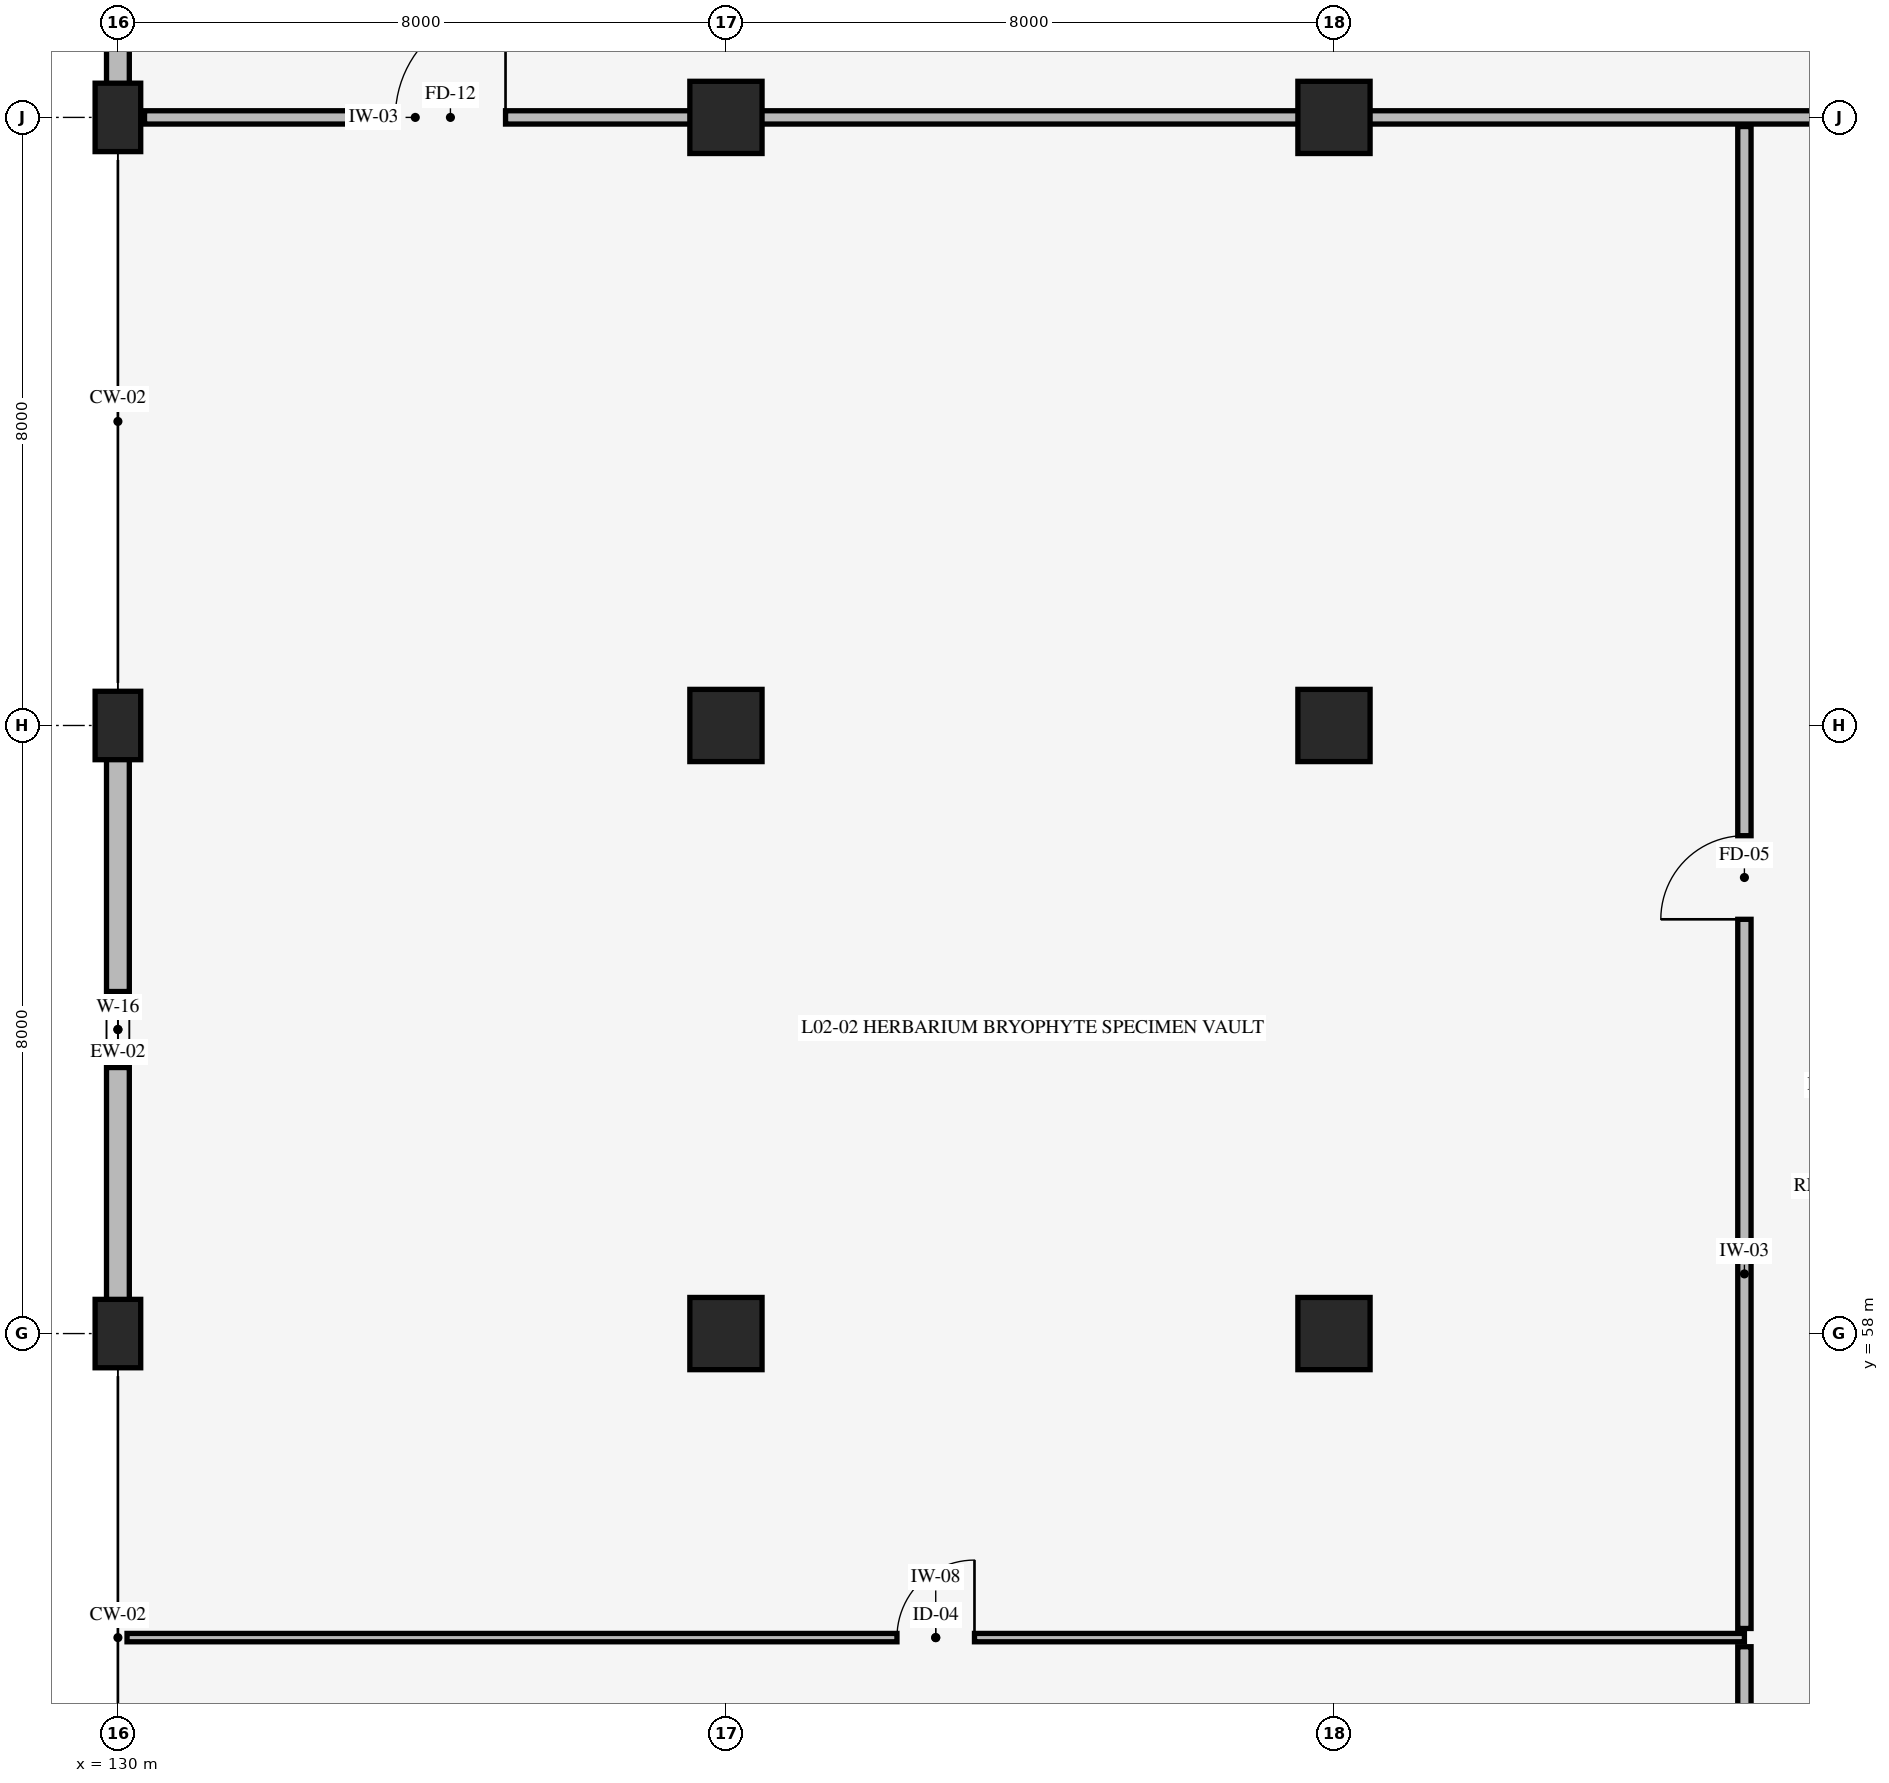
"""IFC4 building model, lengths in metres.
Left out: names, types, materials, properties, quantities, classifications, styles, units other than length and angle.
Written with IfcOpenShell. Run it as: python <this file> out.ifc"""

import sys

from ifc_helpers import new_model, si_unit, direction, frame, frame_2d, origin, origin_2d, place, context, subcontext, project, spatial, rectangle, extrude, element, fill, save


model = new_model("IFC4")
c1 = context("Model", 3, precision=1e-05, world=origin(), true_north=direction((0.0, 1.0)))
c2 = subcontext(c1, "Body", "Model", "MODEL_VIEW")
j1 = project(units=[si_unit("LENGTHUNIT", "METRE"), si_unit("PLANEANGLEUNIT", "RADIAN")], contexts=[c1])
p1 = place(None, origin())
s1 = spatial("IfcSite", under=j1, at=p1, CompositionType="ELEMENT")
p2 = place(p1, origin())
s2 = spatial("IfcBuilding", under=s1, at=p2, CompositionType="ELEMENT")
p3 = place(p2, frame((0.0, 0.0, 5.4)))
s3 = spatial("IfcBuildingStorey", under=s2, at=p3, CompositionType="ELEMENT", Elevation=5.4)
for number, where, z_axis, x_axis in (
    (1, (130.0, 58.0, 0.0), (0.0, 0.0, 1.0), (1.0, 0.0, 0.0)),
    (2, (130.0, 66.0, 0.0), (0.0, 0.0, 1.0), (1.0, 0.0, 0.0)),
    (3, (130.0, 74.0, 0.0), (0.0, 0.0, 1.0), (1.0, 0.0, 0.0)),
):
    element("IfcColumn", number, at=place(p3, frame(where, z_axis=z_axis, x_axis=x_axis)), inside=s3, PredefinedType="COLUMN", context=c2, shape_type="SweptSolid", body=[
        extrude(rectangle(XDim=0.6, YDim=0.9, at=origin_2d()), origin(), (0.0, 0.0, 1.0), 4.8),
    ])
for number, where, z_axis, x_axis in (
    (4, (138.0, 58.0, 0.0), (0.0, 0.0, 1.0), (1.0, 0.0, 0.0)),
    (5, (138.0, 66.0, 0.0), (0.0, 0.0, 1.0), (1.0, 0.0, 0.0)),
    (6, (138.0, 74.0, 0.0), (0.0, 0.0, 1.0), (1.0, 0.0, 0.0)),
    (7, (146.0, 58.0, 0.0), (0.0, 0.0, 1.0), (1.0, 0.0, 0.0)),
    (8, (146.0, 66.0, 0.0), (0.0, 0.0, 1.0), (1.0, 0.0, 0.0)),
    (9, (146.0, 74.0, 0.0), (0.0, 0.0, 1.0), (1.0, 0.0, 0.0)),
):
    element("IfcColumn", number, at=place(p3, frame(where, z_axis=z_axis, x_axis=x_axis)), inside=s3, PredefinedType="COLUMN", context=c2, shape_type="SweptSolid", body=[
        extrude(rectangle(XDim=0.95, YDim=0.95, at=origin_2d()), origin(), (0.0, 0.0, 1.0), 4.8),
    ])
p4 = place(p3, frame((130.0, 58.0, 0.0), z_axis=(0.0, 0.0, 1.0), x_axis=(0.0, 1.0, 0.0)))
e10 = element("IfcWall", 10, at=p4, inside=s3, PredefinedType="STANDARD", context=c2, shape_type="SweptSolid", body=[
    extrude(rectangle(XDim=8.0, YDim=0.3, at=frame_2d((4.0, 0.0))), origin(), (0.0, 0.0, 1.0), 3.55),
])
p5 = place(p4, frame((3.5, 0.0, 0.85)))
e11 = element("IfcOpeningElement", 11, at=p5, cuts=e10, PredefinedType="OPENING", context=c2, shape_type="SweptSolid", body=[
    extrude(rectangle(XDim=1.0, YDim=1.5, at=frame_2d((0.5, 0.75))), frame((0.0, 0.16, 0.0), z_axis=(0.0, -1.0, 0.0), x_axis=(1.0, 0.0, 0.0)), (0.0, 0.0, 1.0), 0.32),
])
p6 = place(p3, frame((130.0, 74.0, 0.0), z_axis=(0.0, 0.0, 1.0), x_axis=(0.0, 1.0, 0.0)))
e12 = element("IfcWall", 12, at=p6, inside=s3, PredefinedType="STANDARD", context=c2, shape_type="SweptSolid", body=[
    extrude(rectangle(XDim=8.0, YDim=0.3, at=frame_2d((4.0, 0.0))), origin(), (0.0, 0.0, 1.0), 3.55),
])
p7 = place(p6, frame((2.75, 0.0, 0.0)))
e13 = element("IfcOpeningElement", 13, at=p7, cuts=e12, PredefinedType="OPENING", context=c2, shape_type="SweptSolid", body=[
    extrude(rectangle(XDim=1.5, YDim=2.25, at=frame_2d((0.75, 1.125))), frame((0.0, 0.16, 0.0), z_axis=(0.0, -1.0, 0.0), x_axis=(1.0, 0.0, 0.0)), (0.0, 0.0, 1.0), 0.32),
])
p8 = place(p3, frame((151.4, 34.12, 0.0), z_axis=(0.0, 0.0, 1.0), x_axis=(0.0, 1.0, 0.0)))
e14 = element("IfcWall", 14, at=p8, inside=s3, PredefinedType="STANDARD", context=c2, shape_type="SweptSolid", body=[
    extrude(rectangle(XDim=19.76, YDim=0.175, at=frame_2d((9.88, 0.0))), origin(), (0.0, 0.0, 1.0), 4.5),
])
p9 = place(p8, frame((9.355, 0.0, 0.0)))
e15 = element("IfcOpeningElement", 15, at=p9, cuts=e14, PredefinedType="OPENING", context=c2, shape_type="SweptSolid", body=[
    extrude(rectangle(XDim=1.05, YDim=2.1, at=frame_2d((0.525, 1.05))), frame((0.0, 0.098, 0.0), z_axis=(0.0, -1.0, 0.0), x_axis=(1.0, 0.0, 0.0)), (0.0, 0.0, 1.0), 0.195),
])
p10 = place(p3, frame((130.12, 54.0, 0.0), z_axis=(0.0, 0.0, 1.0), x_axis=(1.0, 0.0, 0.0)))
e16 = element("IfcWall", 16, at=p10, inside=s3, PredefinedType="STANDARD", context=c2, shape_type="SweptSolid", body=[
    extrude(rectangle(XDim=21.28, YDim=0.11, at=frame_2d((10.64, 0.0))), origin(), (0.0, 0.0, 1.0), 4.5),
])
p11 = place(p10, frame((10.13, 0.0, 0.0)))
e17 = element("IfcOpeningElement", 17, at=p11, cuts=e16, PredefinedType="OPENING", context=c2, shape_type="SweptSolid", body=[
    extrude(rectangle(XDim=1.02, YDim=2.08, at=frame_2d((0.51, 1.04))), frame((0.0, 0.065, 0.0), z_axis=(0.0, -1.0, 0.0), x_axis=(1.0, 0.0, 0.0)), (0.0, 0.0, 1.0), 0.13),
])
p12 = place(p3, frame((151.4, 54.12, 0.0), z_axis=(0.0, 0.0, 1.0), x_axis=(0.0, 1.0, 0.0)))
e18 = element("IfcWall", 18, at=p12, inside=s3, PredefinedType="STANDARD", context=c2, shape_type="SweptSolid", body=[
    extrude(rectangle(XDim=19.76, YDim=0.175, at=frame_2d((9.88, 0.0))), origin(), (0.0, 0.0, 1.0), 4.5),
])
p13 = place(p12, frame((9.33, 0.0, 0.0)))
e19 = element("IfcOpeningElement", 19, at=p13, cuts=e18, PredefinedType="OPENING", context=c2, shape_type="SweptSolid", body=[
    extrude(rectangle(XDim=1.1, YDim=2.1, at=frame_2d((0.55, 1.05))), frame((0.0, 0.098, 0.0), z_axis=(0.0, -1.0, 0.0), x_axis=(1.0, 0.0, 0.0)), (0.0, 0.0, 1.0), 0.195),
])
p14 = place(p3, frame((130.35, 74.0, 0.0), z_axis=(0.0, 0.0, 1.0), x_axis=(1.0, 0.0, 0.0)))
e20 = element("IfcWall", 20, at=p14, inside=s3, PredefinedType="STANDARD", context=c2, shape_type="SweptSolid", body=[
    extrude(rectangle(XDim=31.3, YDim=0.175, at=frame_2d((15.65, 0.0))), origin(), (0.0, 0.0, 1.0), 3.6),
])
p15 = place(p14, frame((3.3, 0.0, 0.0)))
e21 = element("IfcOpeningElement", 21, at=p15, cuts=e20, PredefinedType="OPENING", context=c2, shape_type="SweptSolid", body=[
    extrude(rectangle(XDim=1.45, YDim=2.2, at=frame_2d((0.725, 1.1))), frame((0.0, 0.098, 0.0), z_axis=(0.0, -1.0, 0.0), x_axis=(1.0, 0.0, 0.0)), (0.0, 0.0, 1.0), 0.195),
])
p16 = place(p5, origin())
e22 = element("IfcWindow", 22, at=p16, inside=s3, PartitioningType="SINGLE_PANEL", PredefinedType="WINDOW", context=c2, shape_type="SweptSolid", body=[
    extrude(rectangle(XDim=1.0, YDim=1.5, at=frame_2d((0.5, 0.75))), frame((0.0, 0.03, 0.0), z_axis=(0.0, -1.0, 0.0), x_axis=(1.0, 0.0, 0.0)), (0.0, 0.0, 1.0), 0.06),
])
fill(e11, e22)
p17 = place(p11, origin())
e23 = element("IfcDoor", 23, at=p17, inside=s3, OperationType="SINGLE_SWING_RIGHT", PredefinedType="DOOR", context=c2, shape_type="SweptSolid", body=[
    extrude(rectangle(XDim=1.02, YDim=2.08, at=frame_2d((0.51, 1.04))), frame((0.0, 0.025, 0.0), z_axis=(0.0, -1.0, 0.0), x_axis=(1.0, 0.0, 0.0)), (0.0, 0.0, 1.0), 0.05),
])
fill(e17, e23)
p18 = place(p13, origin())
e24 = element("IfcDoor", 24, at=p18, inside=s3, OperationType="SINGLE_SWING_LEFT", PredefinedType="DOOR", context=c2, shape_type="SweptSolid", body=[
    extrude(rectangle(XDim=1.1, YDim=2.1, at=frame_2d((0.55, 1.05))), frame((0.0, 0.025, 0.0), z_axis=(0.0, -1.0, 0.0), x_axis=(1.0, 0.0, 0.0)), (0.0, 0.0, 1.0), 0.05),
])
fill(e19, e24)
p19 = place(p15, origin())
e25 = element("IfcDoor", 25, at=p19, inside=s3, OperationType="SINGLE_SWING_RIGHT", PredefinedType="DOOR", context=c2, shape_type="SweptSolid", body=[
    extrude(rectangle(XDim=1.45, YDim=2.2, at=frame_2d((0.725, 1.1))), frame((0.0, 0.025, 0.0), z_axis=(0.0, -1.0, 0.0), x_axis=(1.0, 0.0, 0.0)), (0.0, 0.0, 1.0), 0.05),
])
fill(e21, e25)
save(model, sys.argv[1])
